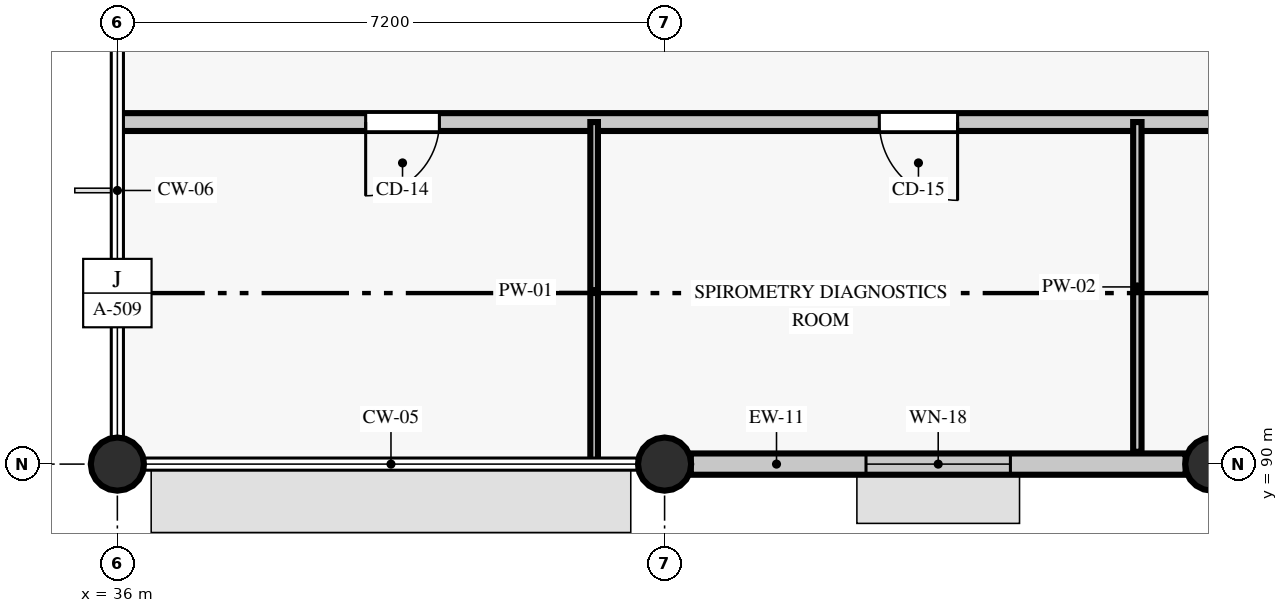
"""IFC4 building model, lengths in metres.
Left out: names, types, materials, properties, quantities, classifications, styles, units other than length and angle.
Written with IfcOpenShell. Run it as: python <this file> out.ifc"""

import sys

from ifc_helpers import new_model, si_unit, direction, frame, frame_2d, origin, origin_2d, place, context, subcontext, project, spatial, rectangle, circle, extrude, element, fill, save


model = new_model("IFC4")
c1 = context("Model", 3, precision=1e-05, world=origin(), true_north=direction((0.0, 1.0)))
c2 = subcontext(c1, "Body", "Model", "MODEL_VIEW")
j1 = project(units=[si_unit("LENGTHUNIT", "METRE"), si_unit("PLANEANGLEUNIT", "RADIAN")], contexts=[c1])
p1 = place(None, origin())
s1 = spatial("IfcSite", under=j1, at=p1, CompositionType="ELEMENT")
p2 = place(p1, origin())
s2 = spatial("IfcBuilding", under=s1, at=p2, CompositionType="ELEMENT")
p3 = place(p2, frame((0.0, 0.0, 4.8)))
s3 = spatial("IfcBuildingStorey", under=s2, at=p3, CompositionType="ELEMENT", Elevation=4.8)
p4 = place(p3, frame((36.0, 90.0, 0.0), z_axis=(0.0, 0.0, 1.0), x_axis=(1.0, 0.0, 0.0)))
e1 = element("IfcColumn", 1, at=p4, inside=s3, PredefinedType="COLUMN", context=c2, shape_type="SweptSolid", body=[
    extrude(circle(Radius=0.35, at=origin_2d()), origin(), (0.0, 0.0, 1.0), 4.585),
])
for number, where, z_axis, x_axis in (
    (2, (43.2, 90.0, 0.0), (0.0, 0.0, 1.0), (1.0, 0.0, 0.0)),
    (3, (50.4, 90.0, 0.0), (0.0, 0.0, 1.0), (1.0, 0.0, 0.0)),
):
    element("IfcColumn", number, at=place(p3, frame(where, z_axis=z_axis, x_axis=x_axis)), inside=s3, PredefinedType="COLUMN", context=c2, shape_type="SweptSolid", body=[
        extrude(circle(Radius=0.35, at=origin_2d()), origin(), (0.0, 0.0, 1.0), 4.555),
    ])
p5 = place(p3, frame((43.545, 90.0, 0.0), z_axis=(0.0, 0.0, 1.0), x_axis=(1.0, 0.0, 0.0)))
e4 = element("IfcWall", 4, at=p5, inside=s3, PredefinedType="STANDARD", context=c2, shape_type="SweptSolid", body=[
    extrude(rectangle(XDim=6.51, YDim=0.28, at=frame_2d((3.255, 0.0))), origin(), (0.0, 0.0, 1.0), 3.905),
])
p6 = place(p5, frame((2.305, 0.0, 0.9)))
e5 = element("IfcOpeningElement", 5, at=p6, cuts=e4, PredefinedType="OPENING", context=c2, shape_type="SweptSolid", body=[
    extrude(rectangle(XDim=1.9, YDim=1.42, at=frame_2d((0.95, 0.71))), frame((0.0, 0.15, 0.0), z_axis=(0.0, -1.0, 0.0), x_axis=(1.0, 0.0, 0.0)), (0.0, 0.0, 1.0), 0.3),
])
p7 = place(p3, frame((36.04, 94.5, 0.0), z_axis=(0.0, 0.0, 1.0), x_axis=(1.0, 0.0, 0.0)))
e6 = element("IfcWall", 6, at=p7, inside=s3, PredefinedType="PARTITIONING", context=c2, shape_type="SweptSolid", body=[
    extrude(rectangle(XDim=21.54, YDim=0.235, at=frame_2d((10.77, 0.0))), origin(), (0.0, 0.0, 1.0), 3.935),
])
p8 = place(p7, frame((3.227, 0.0, 0.0)))
e7 = element("IfcOpeningElement", 7, at=p8, cuts=e6, PredefinedType="OPENING", context=c2, shape_type="SweptSolid", body=[
    extrude(rectangle(XDim=0.97, YDim=2.18, at=frame_2d((0.485, 1.09))), frame((0.0, 0.127, 0.0), z_axis=(0.0, -1.0, 0.0), x_axis=(1.0, 0.0, 0.0)), (0.0, 0.0, 1.0), 0.255),
])
p9 = place(p7, frame((9.985, 0.0, 0.0)))
e8 = element("IfcOpeningElement", 8, at=p9, cuts=e6, PredefinedType="OPENING", context=c2, shape_type="SweptSolid", body=[
    extrude(rectangle(XDim=1.03, YDim=2.18, at=frame_2d((0.515, 1.09))), frame((0.0, 0.127, 0.0), z_axis=(0.0, -1.0, 0.0), x_axis=(1.0, 0.0, 0.0)), (0.0, 0.0, 1.0), 0.255),
])
p10 = place(p7, frame((17.74, 0.0, 0.0)))
e9 = element("IfcOpeningElement", 9, at=p10, cuts=e6, PredefinedType="OPENING", context=c2, shape_type="SweptSolid", body=[
    extrude(rectangle(XDim=1.08, YDim=2.18, at=frame_2d((0.54, 1.09))), frame((0.0, 0.127, 0.0), z_axis=(0.0, -1.0, 0.0), x_axis=(1.0, 0.0, 0.0)), (0.0, 0.0, 1.0), 0.255),
])
p11 = place(p3, frame((42.273, 90.04, 0.0), z_axis=(0.0, 0.0, 1.0), x_axis=(0.0, 1.0, 0.0)))
e10 = element("IfcWall", 10, at=p11, inside=s3, PredefinedType="PARTITIONING", context=c2, shape_type="SweptSolid", body=[
    extrude(rectangle(XDim=4.46, YDim=0.1, at=frame_2d((2.23, 0.0))), origin(), (0.0, 0.0, 1.0), 4.085),
])
p12 = place(p3, frame((49.42, 90.162, 0.0), z_axis=(0.0, 0.0, 1.0), x_axis=(0.0, 1.0, 0.0)))
e11 = element("IfcWall", 11, at=p12, inside=s3, PredefinedType="PARTITIONING", context=c2, shape_type="SweptSolid", body=[
    extrude(rectangle(XDim=4.338, YDim=0.11, at=frame_2d((2.169, 0.0))), origin(), (0.0, 0.0, 1.0), 4.055),
])
p13 = place(p6, origin())
e12 = element("IfcWindow", 12, at=p13, inside=s3, PartitioningType="SINGLE_PANEL", PredefinedType="WINDOW", context=c2, shape_type="SweptSolid", body=[
    extrude(rectangle(XDim=1.9, YDim=1.42, at=frame_2d((0.95, 0.71))), frame((0.0, 0.03, 0.0), z_axis=(0.0, -1.0, 0.0), x_axis=(1.0, 0.0, 0.0)), (0.0, 0.0, 1.0), 0.06),
])
fill(e5, e12)
p14 = place(p8, frame((0.97, 0.0, 0.0), z_axis=(0.0, 0.0, 1.0), x_axis=(-1.0, 0.0, 0.0)))
e13 = element("IfcDoor", 13, at=p14, inside=s3, OperationType="SINGLE_SWING_RIGHT", PredefinedType="DOOR", context=c2, shape_type="SweptSolid", body=[
    extrude(rectangle(XDim=0.97, YDim=2.18, at=frame_2d((0.485, 1.09))), frame((0.0, 0.025, 0.0), z_axis=(0.0, -1.0, 0.0), x_axis=(1.0, 0.0, 0.0)), (0.0, 0.0, 1.0), 0.05),
])
fill(e7, e13)
p15 = place(p9, frame((1.03, 0.0, 0.0), z_axis=(0.0, 0.0, 1.0), x_axis=(-1.0, 0.0, 0.0)))
e14 = element("IfcDoor", 14, at=p15, inside=s3, OperationType="SINGLE_SWING_LEFT", PredefinedType="DOOR", context=c2, shape_type="SweptSolid", body=[
    extrude(rectangle(XDim=1.03, YDim=2.18, at=frame_2d((0.515, 1.09))), frame((0.0, 0.025, 0.0), z_axis=(0.0, -1.0, 0.0), x_axis=(1.0, 0.0, 0.0)), (0.0, 0.0, 1.0), 0.05),
])
fill(e8, e14)
save(model, sys.argv[1])
